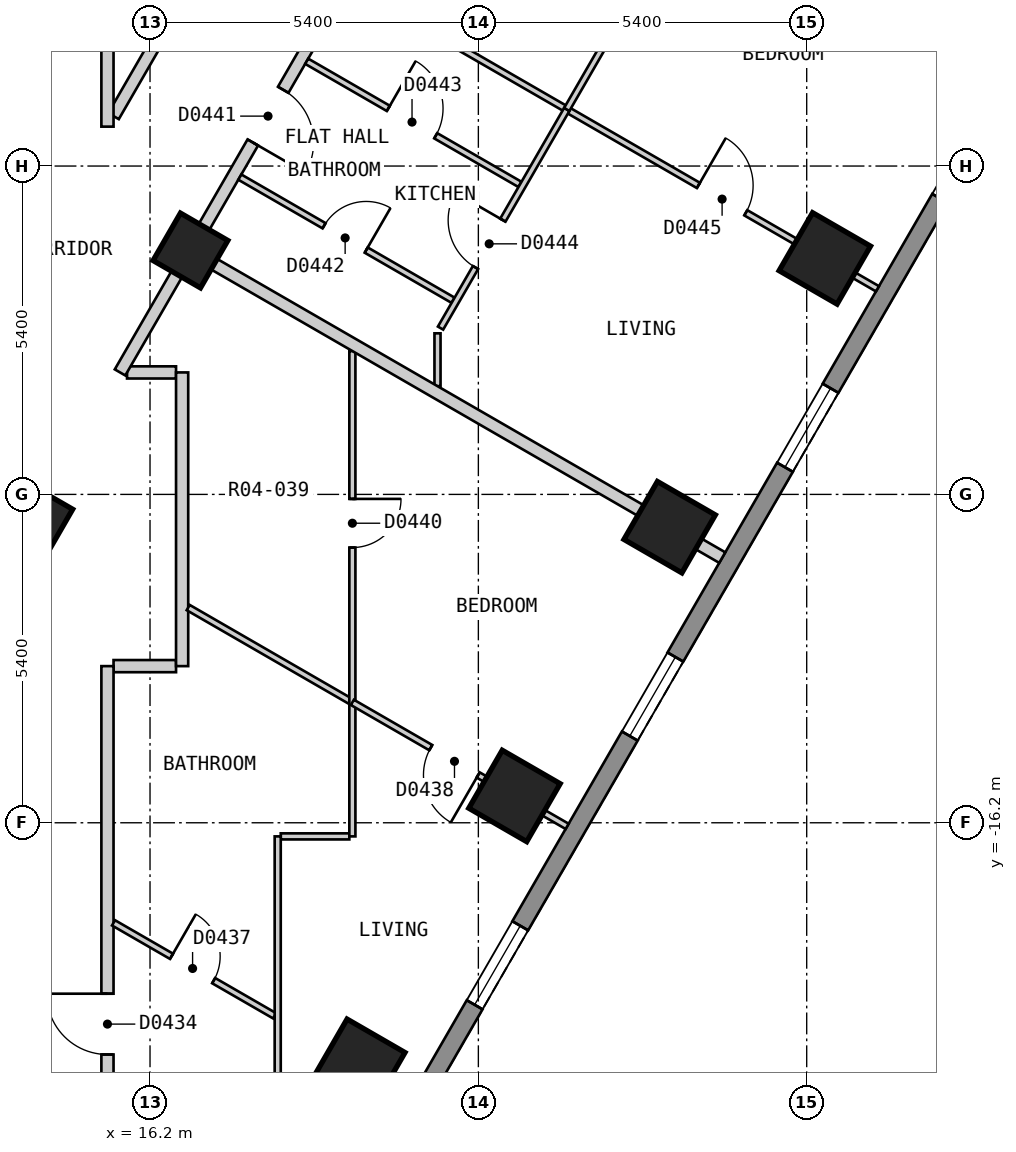
"""IFC4 building model, lengths in metres.
Left out: names, types, materials, properties, quantities, classifications, styles, units other than length and angle.
Written with IfcOpenShell. Run it as: python <this file> out.ifc"""

import sys

from ifc_helpers import new_model, si_unit, direction, frame, frame_2d, origin, origin_2d, place, context, subcontext, project, spatial, polyline, rectangle, outline, extrude, element, fill, save


model = new_model("IFC4")
c1 = context("Model", 3, precision=1e-05, world=origin(), true_north=direction((0.0, 1.0)))
c2 = subcontext(c1, "Body", "Model", "MODEL_VIEW")
j1 = project(units=[si_unit("LENGTHUNIT", "METRE"), si_unit("PLANEANGLEUNIT", "RADIAN")], contexts=[c1])
p1 = place(None, origin())
s1 = spatial("IfcSite", under=j1, at=p1, CompositionType="ELEMENT")
p2 = place(p1, origin())
s2 = spatial("IfcBuilding", under=s1, at=p2, CompositionType="ELEMENT")
p3 = place(p2, frame((0.0, 0.0, 38.4)))
s3 = spatial("IfcBuildingStorey", under=s2, at=p3, CompositionType="ELEMENT", Elevation=38.4)
for number, where, z_axis, x_axis in (
    (1, (19.642, -20.18, 0.0), (0.0, 0.0, 1.0), (0.5, 0.866, 0.0)),
    (2, (22.194, -15.759, 0.0), (0.0, 0.0, 1.0), (0.5, 0.866, 0.0)),
    (3, (24.746, -11.339, 0.0), (0.0, 0.0, 1.0), (0.5, 0.866, 0.0)),
    (4, (27.298, -6.919, 0.0), (0.0, 0.0, 1.0), (0.5, 0.866, 0.0)),
):
    element("IfcColumn", number, at=place(p3, frame(where, z_axis=z_axis, x_axis=x_axis)), inside=s3, PredefinedType="COLUMN", context=c2, shape_type="SweptSolid", body=[
        extrude(rectangle(XDim=1.1, YDim=1.1, at=origin_2d()), origin(), (0.0, 0.0, 1.0), 3.0),
    ])
for number, where, z_axis, x_axis in (
    (5, (14.313, -11.209, 0.0), (0.0, 0.0, 1.0), (0.5, 0.866, 0.0)),
    (6, (16.865, -6.789, 0.0), (0.0, 0.0, 1.0), (0.5, 0.866, 0.0)),
):
    element("IfcColumn", number, at=place(p3, frame(where, z_axis=z_axis, x_axis=x_axis)), inside=s3, PredefinedType="COLUMN", context=c2, shape_type="SweptSolid", body=[
        extrude(rectangle(XDim=0.9, YDim=0.9, at=origin_2d()), origin(), (0.0, 0.0, 1.0), 3.0),
    ])
p4 = place(p3, frame((17.71, -25.825, 0.0), z_axis=(0.0, 0.0, 1.0), x_axis=(0.500001938803, 0.866024284413, 0.0)))
e7 = element("IfcWall", 7, at=p4, inside=s3, PredefinedType="SOLIDWALL", context=c2, shape_type="SweptSolid", body=[
    extrude(outline(polyline([(0.0, -0.15), (27.02, -0.15), (26.94, 0.15), (0.08, 0.15), (0.0, -0.15)])), origin(), (0.0, 0.0, 1.0), 2.7),
])
p5 = place(p4, frame((2.553, 0.0, 0.15)))
e8 = element("IfcOpeningElement", 8, at=p5, cuts=e7, PredefinedType="OPENING", context=c2, shape_type="SweptSolid", body=[
    extrude(rectangle(XDim=1.5, YDim=2.1, at=frame_2d((0.75, 1.05))), frame((0.0, 0.16, 0.0), z_axis=(0.0, -1.0, 0.0), x_axis=(1.0, 0.0, 0.0)), (0.0, 0.0, 1.0), 0.32),
])
p6 = place(p4, frame((7.658, 0.0, 0.15)))
e9 = element("IfcOpeningElement", 9, at=p6, cuts=e7, PredefinedType="OPENING", context=c2, shape_type="SweptSolid", body=[
    extrude(rectangle(XDim=1.5, YDim=2.1, at=frame_2d((0.75, 1.05))), frame((0.0, 0.16, 0.0), z_axis=(0.0, -1.0, 0.0), x_axis=(1.0, 0.0, 0.0)), (0.0, 0.0, 1.0), 0.32),
])
p7 = place(p4, frame((12.761, 0.0, 0.15)))
e10 = element("IfcOpeningElement", 10, at=p7, cuts=e7, PredefinedType="OPENING", context=c2, shape_type="SweptSolid", body=[
    extrude(rectangle(XDim=1.5, YDim=2.1, at=frame_2d((0.75, 1.05))), frame((0.0, 0.16, 0.0), z_axis=(0.0, -1.0, 0.0), x_axis=(1.0, 0.0, 0.0)), (0.0, 0.0, 1.0), 0.32),
])
p8 = place(p4, frame((17.865, 0.0, 0.15)))
e11 = element("IfcOpeningElement", 11, at=p8, cuts=e7, PredefinedType="OPENING", context=c2, shape_type="SweptSolid", body=[
    extrude(rectangle(XDim=1.5, YDim=2.1, at=frame_2d((0.75, 1.05))), frame((0.0, 0.16, 0.0), z_axis=(0.0, -1.0, 0.0), x_axis=(1.0, 0.0, 0.0)), (0.0, 0.0, 1.0), 0.32),
])
p9 = place(p4, frame((22.969, 0.0, 0.15)))
e12 = element("IfcOpeningElement", 12, at=p9, cuts=e7, PredefinedType="OPENING", context=c2, shape_type="SweptSolid", body=[
    extrude(rectangle(XDim=1.5, YDim=2.1, at=frame_2d((0.75, 1.05))), frame((0.0, 0.16, 0.0), z_axis=(0.0, -1.0, 0.0), x_axis=(1.0, 0.0, 0.0)), (0.0, 0.0, 1.0), 0.32),
])
p10 = place(p3, frame((15.822, -8.794, 0.0), z_axis=(0.0, 0.0, 1.0), x_axis=(1.0, 0.0, 0.0)))
e13 = element("IfcWall", 13, at=p10, inside=s3, PredefinedType="PARTITIONING", context=c2, shape_type="SweptSolid", body=[
    extrude(rectangle(XDim=0.806, YDim=0.2, at=frame_2d((0.403, 0.0))), origin(), (0.0, 0.0, 1.0), 2.7),
])
p11 = place(p3, frame((15.6, -13.624, 0.0), z_axis=(0.0, 0.0, 1.0), x_axis=(1.0, 0.0, 0.0)))
e14 = element("IfcWall", 14, at=p11, inside=s3, PredefinedType="PARTITIONING", context=c2, shape_type="SweptSolid", body=[
    extrude(rectangle(XDim=1.028, YDim=0.2, at=frame_2d((0.514, 0.0))), origin(), (0.0, 0.0, 1.0), 2.7),
])
p12 = place(p3, frame((15.6, -4.579, 0.0), z_axis=(0.0, 0.0, 1.0), x_axis=(0.499927597274, 0.866067201483, 0.0)))
e15 = element("IfcWall", 15, at=p12, inside=s3, PredefinedType="PARTITIONING", context=c2, shape_type="SweptSolid", body=[
    extrude(rectangle(XDim=5.288, YDim=0.2, at=frame_2d((2.644, 0.0))), origin(), (0.0, 0.0, 1.0), 2.7),
])
p13 = place(p3, frame((15.707, -8.794, 0.0), z_axis=(0.0, 0.0, 1.0), x_axis=(0.500016151272, 0.866016078642, 0.0)))
e16 = element("IfcWall", 16, at=p13, inside=s3, PredefinedType="PARTITIONING", context=c2, shape_type="SweptSolid", body=[
    extrude(rectangle(XDim=10.098, YDim=0.2, at=frame_2d((5.049, 0.0))), origin(), (0.0, 0.0, 1.0), 2.7),
])
p14 = place(p13, frame((4.367, 0.0, 0.0)))
e17 = element("IfcOpeningElement", 17, at=p14, cuts=e16, PredefinedType="OPENING", context=c2, shape_type="SweptSolid", body=[
    extrude(rectangle(XDim=1.0, YDim=2.1, at=frame_2d((0.5, 1.05))), frame((0.0, 0.11, 0.0), z_axis=(0.0, -1.0, 0.0), x_axis=(1.0, 0.0, 0.0)), (0.0, 0.0, 1.0), 0.22),
])
p15 = place(p3, frame((15.5, -21.199, 0.0), z_axis=(0.0, 0.0, 1.0), x_axis=(0.0, 1.0, 0.0)))
e18 = element("IfcWall", 18, at=p15, inside=s3, PredefinedType="PARTITIONING", context=c2, shape_type="SweptSolid", body=[
    extrude(rectangle(XDim=7.575, YDim=0.2, at=frame_2d((3.788, 0.0))), origin(), (0.0, 0.0, 1.0), 2.7),
])
p16 = place(p15, frame((1.188, 0.0, 0.0)))
e19 = element("IfcOpeningElement", 19, at=p16, cuts=e18, PredefinedType="OPENING", context=c2, shape_type="SweptSolid", body=[
    extrude(rectangle(XDim=1.0, YDim=2.1, at=frame_2d((0.5, 1.05))), frame((0.0, 0.11, 0.0), z_axis=(0.0, -1.0, 0.0), x_axis=(1.0, 0.0, 0.0)), (0.0, 0.0, 1.0), 0.22),
])
p17 = place(p3, frame((15.5, -4.752, 0.0), z_axis=(0.0, 0.0, 1.0), x_axis=(0.0, 1.0, 0.0)))
e20 = element("IfcWall", 20, at=p17, inside=s3, PredefinedType="PARTITIONING", context=c2, shape_type="SweptSolid", body=[
    extrude(rectangle(XDim=1.952, YDim=0.2, at=frame_2d((0.976, 0.0))), origin(), (0.0, 0.0, 1.0), 2.7),
])
p18 = place(p3, frame((16.728, -13.624, 0.0), z_axis=(0.0, 0.0, 1.0), x_axis=(0.0, 1.0, 0.0)))
e21 = element("IfcWall", 21, at=p18, inside=s3, PredefinedType="PARTITIONING", context=c2, shape_type="SweptSolid", body=[
    extrude(rectangle(XDim=4.83, YDim=0.2, at=frame_2d((2.415, 0.0))), origin(), (0.0, 0.0, 1.0), 2.7),
])
p19 = place(p3, frame((15.6, -17.846, 0.0), z_axis=(0.0, 0.0, 1.0), x_axis=(0.866148385016, -0.499786929736, 0.0)))
e22 = element("IfcWall", 22, at=p19, inside=s3, PredefinedType="PARTITIONING", context=c2, shape_type="SweptSolid", body=[
    extrude(rectangle(XDim=3.059, YDim=0.1, at=frame_2d((1.53, 0.0))), origin(), (0.0, 0.0, 1.0), 2.7),
])
p20 = place(p19, frame((1.101, 0.0, 0.0)))
e23 = element("IfcOpeningElement", 23, at=p20, cuts=e22, PredefinedType="OPENING", context=c2, shape_type="SweptSolid", body=[
    extrude(rectangle(XDim=0.8, YDim=2.1, at=frame_2d((0.4, 1.05))), frame((0.0, 0.06, 0.0), z_axis=(0.0, -1.0, 0.0), x_axis=(1.0, 0.0, 0.0)), (0.0, 0.0, 1.0), 0.12),
])
p21 = place(p3, frame((16.828, -12.661, 0.0), z_axis=(0.0, 0.0, 1.0), x_axis=(0.866008246423, -0.500029716244, 0.0)))
e24 = element("IfcWall", 24, at=p21, inside=s3, PredefinedType="PARTITIONING", context=c2, shape_type="SweptSolid", body=[
    extrude(rectangle(XDim=3.118, YDim=0.1, at=frame_2d((1.559, 0.0))), origin(), (0.0, 0.0, 1.0), 2.7),
])
p22 = place(p3, frame((17.677, -5.582, 0.0), z_axis=(0.0, 0.0, 1.0), x_axis=(0.866015917575, -0.500016430238, 0.0)))
e25 = element("IfcWall", 25, at=p22, inside=s3, PredefinedType="PARTITIONING", context=c2, shape_type="SweptSolid", body=[
    extrude(rectangle(XDim=4.05, YDim=0.1, at=frame_2d((2.025, 0.0))), origin(), (0.0, 0.0, 1.0), 2.7),
])
p23 = place(p22, frame((1.6, 0.0, 0.0)))
e26 = element("IfcOpeningElement", 26, at=p23, cuts=e25, PredefinedType="OPENING", context=c2, shape_type="SweptSolid", body=[
    extrude(rectangle(XDim=0.8, YDim=2.1, at=frame_2d((0.4, 1.05))), frame((0.0, 0.06, 0.0), z_axis=(0.0, -1.0, 0.0), x_axis=(1.0, 0.0, 0.0)), (0.0, 0.0, 1.0), 0.12),
])
p24 = place(p3, frame((18.777, -3.677, 0.0), z_axis=(0.0, 0.0, 1.0), x_axis=(0.866000843773, -0.500042536776, 0.0)))
e27 = element("IfcWall", 27, at=p24, inside=s3, PredefinedType="PARTITIONING", context=c2, shape_type="SweptSolid", body=[
    extrude(rectangle(XDim=4.05, YDim=0.1, at=frame_2d((2.025, 0.0))), origin(), (0.0, 0.0, 1.0), 2.7),
])
p25 = place(p24, frame((1.55, 0.0, 0.0)))
e28 = element("IfcOpeningElement", 28, at=p25, cuts=e27, PredefinedType="OPENING", context=c2, shape_type="SweptSolid", body=[
    extrude(rectangle(XDim=0.9, YDim=2.1, at=frame_2d((0.45, 1.05))), frame((0.0, 0.06, 0.0), z_axis=(0.0, -1.0, 0.0), x_axis=(1.0, 0.0, 0.0)), (0.0, 0.0, 1.0), 0.12),
])
p26 = place(p3, frame((19.503, -2.419, 0.0), z_axis=(0.0, 0.0, 1.0), x_axis=(0.866047370643, -0.499961950354, 0.0)))
e29 = element("IfcWall", 29, at=p26, inside=s3, PredefinedType="PARTITIONING", context=c2, shape_type="SweptSolid", body=[
    extrude(rectangle(XDim=10.001, YDim=0.1, at=frame_2d((5.0, 0.0))), origin(), (0.0, 0.0, 1.0), 2.7),
])
p27 = place(p26, frame((6.6, 0.0, 0.0)))
e30 = element("IfcOpeningElement", 30, at=p27, cuts=e29, PredefinedType="OPENING", context=c2, shape_type="SweptSolid", body=[
    extrude(rectangle(XDim=0.9, YDim=2.1, at=frame_2d((0.45, 1.05))), frame((0.0, 0.06, 0.0), z_axis=(0.0, -1.0, 0.0), x_axis=(1.0, 0.0, 0.0)), (0.0, 0.0, 1.0), 0.12),
])
p28 = place(p3, frame((18.35, -16.424, 0.0), z_axis=(0.0, 0.0, 1.0), x_axis=(1.0, 0.0, 0.0)))
e31 = element("IfcWall", 31, at=p28, inside=s3, PredefinedType="PARTITIONING", context=c2, shape_type="SweptSolid", body=[
    extrude(rectangle(XDim=1.128, YDim=0.1, at=frame_2d((0.564, 0.0))), origin(), (0.0, 0.0, 1.0), 2.7),
])
p29 = place(p3, frame((20.978, -8.065, 0.0), z_axis=(0.0, 0.0, 1.0), x_axis=(0.499965068118, 0.866045570776, 0.0)))
e32 = element("IfcWall", 32, at=p29, inside=s3, PredefinedType="PARTITIONING", context=c2, shape_type="SweptSolid", body=[
    extrude(rectangle(XDim=4.152, YDim=0.1, at=frame_2d((2.076, 0.0))), origin(), (0.0, 0.0, 1.0), 2.7),
])
p30 = place(p29, frame((1.15, 0.0, 0.0)))
e33 = element("IfcOpeningElement", 33, at=p30, cuts=e32, PredefinedType="OPENING", context=c2, shape_type="SweptSolid", body=[
    extrude(rectangle(XDim=0.9, YDim=2.1, at=frame_2d((0.45, 1.05))), frame((0.0, 0.06, 0.0), z_axis=(0.0, -1.0, 0.0), x_axis=(1.0, 0.0, 0.0)), (0.0, 0.0, 1.0), 0.12),
])
p31 = place(p3, frame((18.3, -24.0, 0.0), z_axis=(0.0, 0.0, 1.0), x_axis=(0.0, 1.0, 0.0)))
e34 = element("IfcWall", 34, at=p31, inside=s3, PredefinedType="PARTITIONING", context=c2, shape_type="SweptSolid", body=[
    extrude(rectangle(XDim=7.576, YDim=0.1, at=frame_2d((3.788, 0.0))), origin(), (0.0, 0.0, 1.0), 2.7),
])
p32 = place(p3, frame((19.528, -16.424, 0.0), z_axis=(0.0, 0.0, 1.0), x_axis=(0.0, 1.0, 0.0)))
e35 = element("IfcWall", 35, at=p32, inside=s3, PredefinedType="PARTITIONING", context=c2, shape_type="SweptSolid", body=[
    extrude(rectangle(XDim=7.982, YDim=0.1, at=frame_2d((3.991, 0.0))), origin(), (0.0, 0.0, 1.0), 2.7),
])
p33 = place(p32, frame((4.75, 0.0, 0.0)))
e36 = element("IfcOpeningElement", 36, at=p33, cuts=e35, PredefinedType="OPENING", context=c2, shape_type="SweptSolid", body=[
    extrude(rectangle(XDim=0.8, YDim=2.1, at=frame_2d((0.4, 1.05))), frame((0.0, 0.06, 0.0), z_axis=(0.0, -1.0, 0.0), x_axis=(1.0, 0.0, 0.0)), (0.0, 0.0, 1.0), 0.12),
])
p34 = place(p3, frame((20.928, -9.02, 0.0), z_axis=(0.0, 0.0, 1.0), x_axis=(0.0, 1.0, 0.0)))
e37 = element("IfcWall", 37, at=p34, inside=s3, PredefinedType="PARTITIONING", context=c2, shape_type="SweptSolid", body=[
    extrude(rectangle(XDim=0.869, YDim=0.1, at=frame_2d((0.435, 0.0))), origin(), (0.0, 0.0, 1.0), 2.7),
])
p35 = place(p3, frame((16.951, -6.839, 0.0), z_axis=(0.0, 0.0, 1.0), x_axis=(0.866022959057, -0.500004234368, 0.0)))
e38 = element("IfcWall", 38, at=p35, inside=s3, PredefinedType="PARTITIONING", context=c2, shape_type="SweptSolid", body=[
    extrude(rectangle(XDim=10.0, YDim=0.2, at=frame_2d((5.0, 0.0))), origin(), (0.0, 0.0, 1.0), 2.7),
])
p36 = place(p3, frame((19.528, -14.22, 0.0), z_axis=(0.0, 0.0, 1.0), x_axis=(0.866039047082, -0.499976368371, 0.0)))
e39 = element("IfcWall", 39, at=p36, inside=s3, PredefinedType="PARTITIONING", context=c2, shape_type="SweptSolid", body=[
    extrude(rectangle(XDim=4.078, YDim=0.1, at=frame_2d((2.039, 0.0))), origin(), (0.0, 0.0, 1.0), 2.7),
])
p37 = place(p36, frame((1.489, 0.0, 0.0)))
e40 = element("IfcOpeningElement", 40, at=p37, cuts=e39, PredefinedType="OPENING", context=c2, shape_type="SweptSolid", body=[
    extrude(rectangle(XDim=0.9, YDim=2.1, at=frame_2d((0.45, 1.05))), frame((0.0, 0.06, 0.0), z_axis=(0.0, -1.0, 0.0), x_axis=(1.0, 0.0, 0.0)), (0.0, 0.0, 1.0), 0.12),
])
p38 = place(p3, frame((23.054, -4.469, 0.0), z_axis=(0.0, 0.0, 1.0), x_axis=(0.500023345639, 0.866011924754, 0.0)))
e41 = element("IfcWall", 41, at=p38, inside=s3, PredefinedType="PARTITIONING", context=c2, shape_type="SweptSolid", body=[
    extrude(rectangle(XDim=5.104, YDim=0.1, at=frame_2d((2.552, 0.0))), origin(), (0.0, 0.0, 1.0), 2.7),
])
p39 = place(p38, frame((2.152, 0.0, 0.0)))
e42 = element("IfcOpeningElement", 42, at=p39, cuts=e41, PredefinedType="OPENING", context=c2, shape_type="SweptSolid", body=[
    extrude(rectangle(XDim=0.8, YDim=2.1, at=frame_2d((0.4, 1.05))), frame((0.0, 0.06, 0.0), z_axis=(0.0, -1.0, 0.0), x_axis=(1.0, 0.0, 0.0)), (0.0, 0.0, 1.0), 0.12),
])
p40 = place(p6, origin())
e43 = element("IfcWindow", 43, at=p40, inside=s3, PartitioningType="SINGLE_PANEL", PredefinedType="WINDOW", context=c2, shape_type="SweptSolid", body=[
    extrude(rectangle(XDim=1.5, YDim=2.1, at=frame_2d((0.75, 1.05))), frame((0.0, 0.03, 0.0), z_axis=(0.0, -1.0, 0.0), x_axis=(1.0, 0.0, 0.0)), (0.0, 0.0, 1.0), 0.06),
])
fill(e9, e43)
p41 = place(p7, origin())
e44 = element("IfcWindow", 44, at=p41, inside=s3, PartitioningType="SINGLE_PANEL", PredefinedType="WINDOW", context=c2, shape_type="SweptSolid", body=[
    extrude(rectangle(XDim=1.5, YDim=2.1, at=frame_2d((0.75, 1.05))), frame((0.0, 0.03, 0.0), z_axis=(0.0, -1.0, 0.0), x_axis=(1.0, 0.0, 0.0)), (0.0, 0.0, 1.0), 0.06),
])
fill(e10, e44)
p42 = place(p8, origin())
e45 = element("IfcWindow", 45, at=p42, inside=s3, PartitioningType="SINGLE_PANEL", PredefinedType="WINDOW", context=c2, shape_type="SweptSolid", body=[
    extrude(rectangle(XDim=1.5, YDim=2.1, at=frame_2d((0.75, 1.05))), frame((0.0, 0.03, 0.0), z_axis=(0.0, -1.0, 0.0), x_axis=(1.0, 0.0, 0.0)), (0.0, 0.0, 1.0), 0.06),
])
fill(e11, e45)
p43 = place(p16, origin())
e46 = element("IfcDoor", 46, at=p43, inside=s3, OperationType="SINGLE_SWING_RIGHT", PredefinedType="DOOR", context=c2, shape_type="SweptSolid", body=[
    extrude(rectangle(XDim=1.0, YDim=2.1, at=frame_2d((0.5, 1.05))), frame((0.0, 0.025, 0.0), z_axis=(0.0, -1.0, 0.0), x_axis=(1.0, 0.0, 0.0)), (0.0, 0.0, 1.0), 0.05),
])
fill(e19, e46)
p44 = place(p20, origin())
e47 = element("IfcDoor", 47, at=p44, inside=s3, OperationType="SINGLE_SWING_LEFT", PredefinedType="DOOR", context=c2, shape_type="SweptSolid", body=[
    extrude(rectangle(XDim=0.8, YDim=2.1, at=frame_2d((0.4, 1.05))), frame((0.0, 0.025, 0.0), z_axis=(0.0, -1.0, 0.0), x_axis=(1.0, 0.0, 0.0)), (0.0, 0.0, 1.0), 0.05),
])
fill(e23, e47)
p45 = place(p37, origin())
e48 = element("IfcDoor", 48, at=p45, inside=s3, OperationType="SINGLE_SWING_RIGHT", PredefinedType="DOOR", context=c2, shape_type="SweptSolid", body=[
    extrude(rectangle(XDim=0.9, YDim=2.1, at=frame_2d((0.45, 1.05))), frame((0.0, 0.025, 0.0), z_axis=(0.0, -1.0, 0.0), x_axis=(1.0, 0.0, 0.0)), (0.0, 0.0, 1.0), 0.05),
])
fill(e40, e48)
p46 = place(p33, origin())
e49 = element("IfcDoor", 49, at=p46, inside=s3, OperationType="SINGLE_SWING_RIGHT", PredefinedType="DOOR", context=c2, shape_type="SweptSolid", body=[
    extrude(rectangle(XDim=0.8, YDim=2.1, at=frame_2d((0.4, 1.05))), frame((0.0, 0.025, 0.0), z_axis=(0.0, -1.0, 0.0), x_axis=(1.0, 0.0, 0.0)), (0.0, 0.0, 1.0), 0.05),
])
fill(e36, e49)
p47 = place(p14, origin())
e50 = element("IfcDoor", 50, at=p47, inside=s3, OperationType="SINGLE_SWING_LEFT", PredefinedType="DOOR", context=c2, shape_type="SweptSolid", body=[
    extrude(rectangle(XDim=1.0, YDim=2.1, at=frame_2d((0.5, 1.05))), frame((0.0, 0.025, 0.0), z_axis=(0.0, -1.0, 0.0), x_axis=(1.0, 0.0, 0.0)), (0.0, 0.0, 1.0), 0.05),
])
fill(e17, e50)
p48 = place(p23, origin())
e51 = element("IfcDoor", 51, at=p48, inside=s3, OperationType="SINGLE_SWING_RIGHT", PredefinedType="DOOR", context=c2, shape_type="SweptSolid", body=[
    extrude(rectangle(XDim=0.8, YDim=2.1, at=frame_2d((0.4, 1.05))), frame((0.0, 0.025, 0.0), z_axis=(0.0, -1.0, 0.0), x_axis=(1.0, 0.0, 0.0)), (0.0, 0.0, 1.0), 0.05),
])
fill(e26, e51)
p49 = place(p25, origin())
e52 = element("IfcDoor", 52, at=p49, inside=s3, OperationType="SINGLE_SWING_LEFT", PredefinedType="DOOR", context=c2, shape_type="SweptSolid", body=[
    extrude(rectangle(XDim=0.9, YDim=2.1, at=frame_2d((0.45, 1.05))), frame((0.0, 0.025, 0.0), z_axis=(0.0, -1.0, 0.0), x_axis=(1.0, 0.0, 0.0)), (0.0, 0.0, 1.0), 0.05),
])
fill(e28, e52)
p50 = place(p30, origin())
e53 = element("IfcDoor", 53, at=p50, inside=s3, OperationType="SINGLE_SWING_RIGHT", PredefinedType="DOOR", context=c2, shape_type="SweptSolid", body=[
    extrude(rectangle(XDim=0.9, YDim=2.1, at=frame_2d((0.45, 1.05))), frame((0.0, 0.025, 0.0), z_axis=(0.0, -1.0, 0.0), x_axis=(1.0, 0.0, 0.0)), (0.0, 0.0, 1.0), 0.05),
])
fill(e33, e53)
p51 = place(p27, origin())
e54 = element("IfcDoor", 54, at=p51, inside=s3, OperationType="SINGLE_SWING_LEFT", PredefinedType="DOOR", context=c2, shape_type="SweptSolid", body=[
    extrude(rectangle(XDim=0.9, YDim=2.1, at=frame_2d((0.45, 1.05))), frame((0.0, 0.025, 0.0), z_axis=(0.0, -1.0, 0.0), x_axis=(1.0, 0.0, 0.0)), (0.0, 0.0, 1.0), 0.05),
])
fill(e30, e54)
save(model, sys.argv[1])
